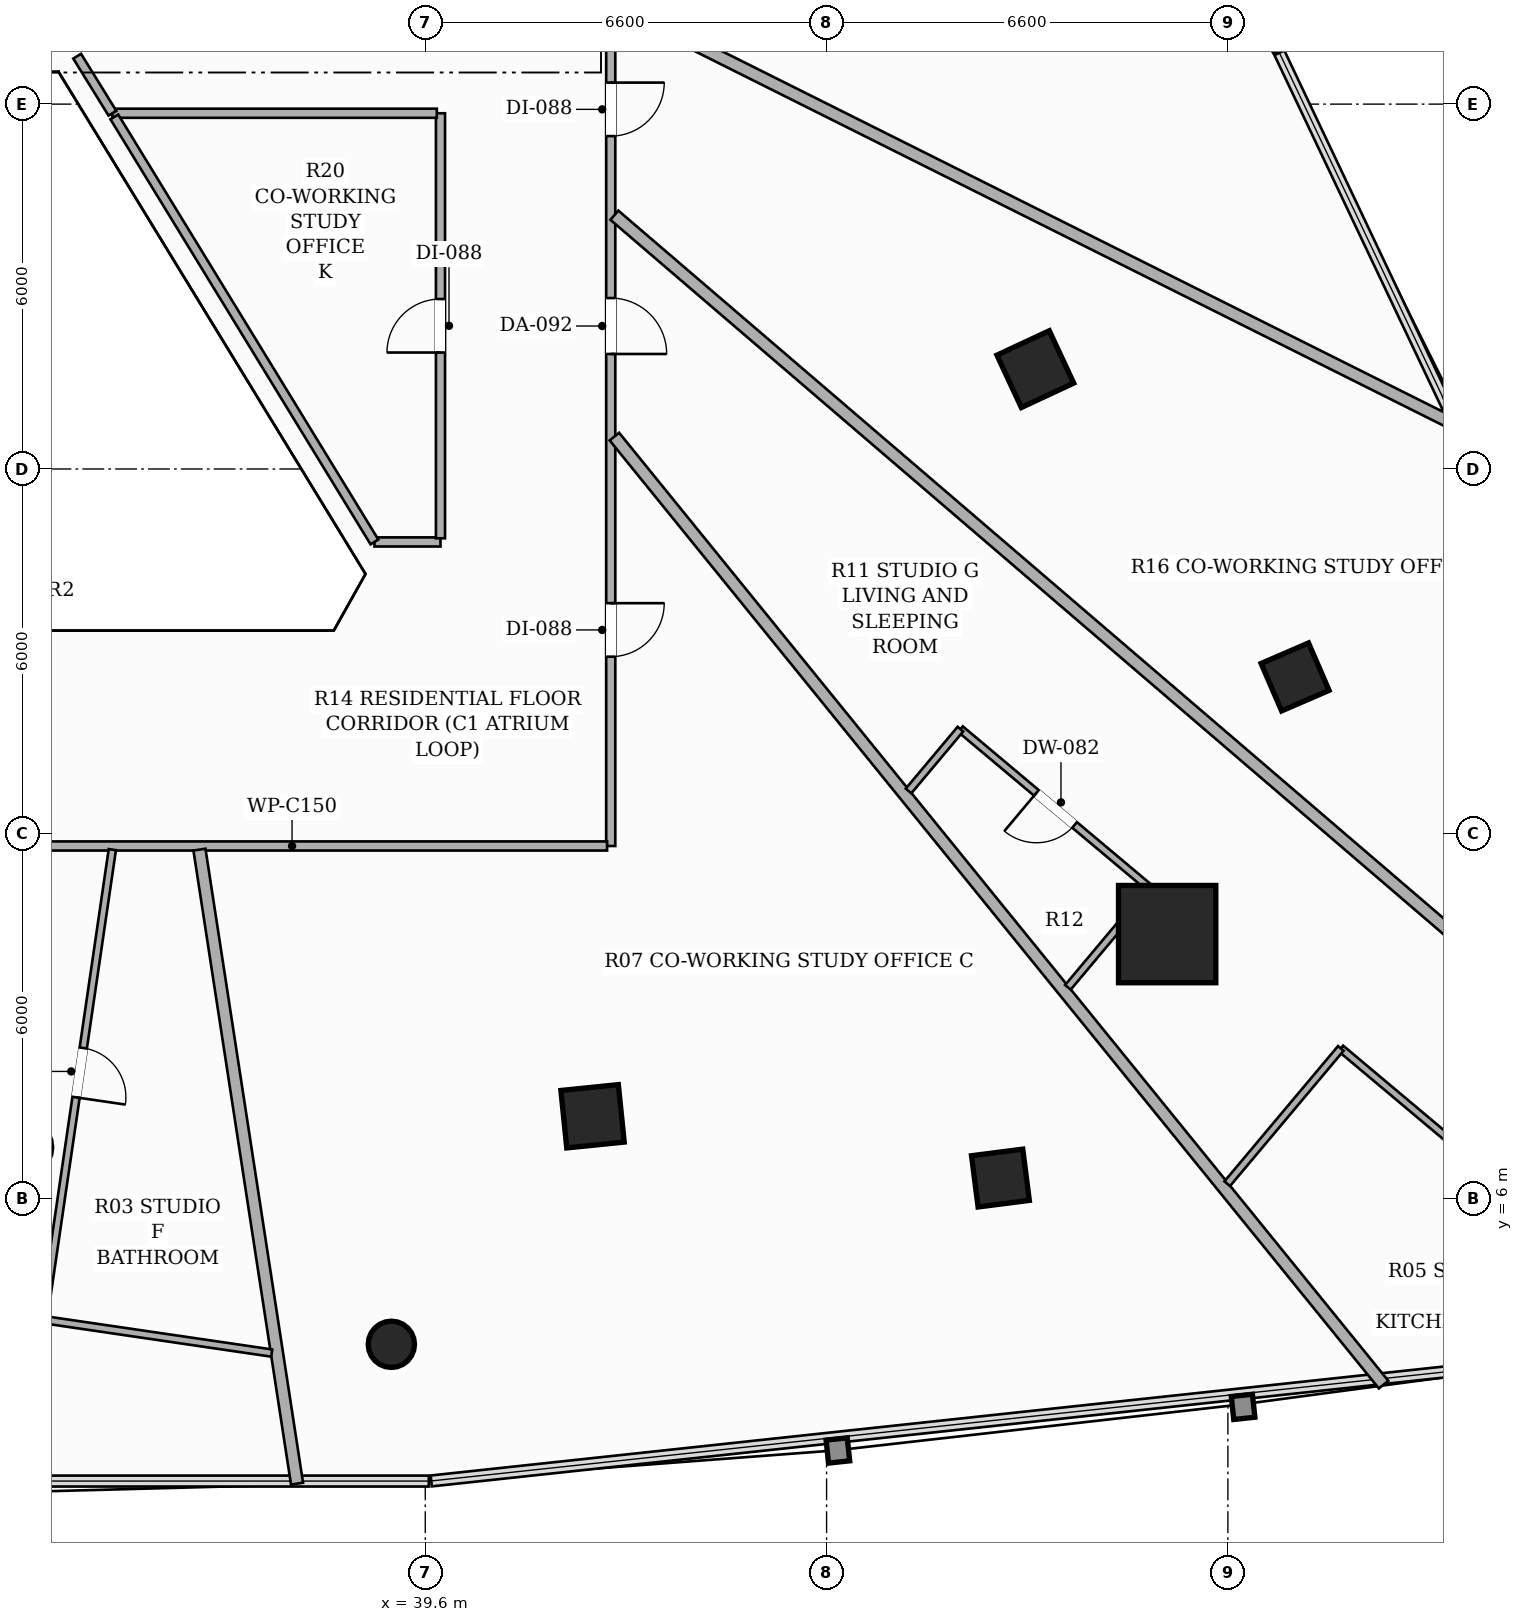
"""IFC4 building model, lengths in metres.
Left out: names, types, materials, properties, quantities, classifications, styles, units other than length and angle.
Written with IfcOpenShell. Run it as: python <this file> out.ifc"""

import sys

from ifc_helpers import new_model, si_unit, direction, frame, frame_2d, origin, origin_2d, place, context, subcontext, project, spatial, rectangle, hollow_rectangle, hollow_circle, extrude, element, fill, save


model = new_model("IFC4")
c1 = context("Model", 3, precision=1e-05, world=origin(), true_north=direction((0.0, 1.0)))
c2 = subcontext(c1, "Body", "Model", "MODEL_VIEW")
j1 = project(units=[si_unit("LENGTHUNIT", "METRE"), si_unit("PLANEANGLEUNIT", "RADIAN")], contexts=[c1])
p1 = place(None, origin())
s1 = spatial("IfcSite", under=j1, at=p1, CompositionType="ELEMENT")
p2 = place(p1, origin())
s2 = spatial("IfcBuilding", under=s1, at=p2, CompositionType="ELEMENT")
p3 = place(p2, frame((0.0, 0.0, 33.5)))
s3 = spatial("IfcBuildingStorey", under=s2, at=p3, CompositionType="ELEMENT", Elevation=33.5)
p4 = place(p3, frame((51.801, 10.351, 0.0), z_axis=(0.0, 0.0, 1.0), x_axis=(1.0, 0.0, 0.0)))
e1 = element("IfcColumn", 1, at=p4, inside=s3, PredefinedType="COLUMN", context=c2, shape_type="SweptSolid", body=[
    extrude(hollow_rectangle(XDim=1.6, YDim=1.6, WallThickness=0.05, at=origin_2d()), origin(), (0.0, 0.0, 1.0), 3.3),
])
p5 = place(p3, frame((33.0, 6.844, 0.0), z_axis=(0.0, 0.0, 1.0), x_axis=(1.0, 0.0, 0.0)))
e2 = element("IfcColumn", 2, at=p5, inside=s3, PredefinedType="COLUMN", context=c2, shape_type="SweptSolid", body=[
    extrude(hollow_circle(Radius=0.457, WallThickness=0.025, at=origin_2d()), origin(), (0.0, 0.0, 1.0), 3.3),
])
for number, where, z_axis, x_axis in (
    (3, (42.351, 7.355, 0.0), (0.0, 0.0, 1.0), (0.995, 0.101, 0.0)),
    (4, (49.633, 19.642, 0.0), (0.0, 0.0, 1.0), (-0.423, 0.906, 0.0)),
):
    element("IfcColumn", number, at=place(p3, frame(where, z_axis=z_axis, x_axis=x_axis)), inside=s3, PredefinedType="COLUMN", context=c2, shape_type="SweptSolid", body=[
        extrude(hollow_rectangle(XDim=0.95, YDim=0.95, WallThickness=0.032, at=origin_2d()), origin(), (0.0, 0.0, 1.0), 3.3),
    ])
for number, where, z_axis, x_axis in (
    (5, (49.059, 6.339, 0.0), (0.0, 0.0, 1.0), (0.992, 0.127, 0.0)),
    (6, (53.905, 14.58, 0.0), (0.0, 0.0, 1.0), (-0.397, 0.918, 0.0)),
):
    element("IfcColumn", number, at=place(p3, frame(where, z_axis=z_axis, x_axis=x_axis)), inside=s3, PredefinedType="COLUMN", context=c2, shape_type="SweptSolid", body=[
        extrude(hollow_rectangle(XDim=0.85, YDim=0.85, WallThickness=0.028, at=origin_2d()), origin(), (0.0, 0.0, 1.0), 3.3),
    ])
p6 = place(p3, frame((39.042, 3.605, 0.0), z_axis=(0.0, 0.0, 1.0), x_axis=(1.0, 0.0, 0.0)))
e7 = element("IfcColumn", 7, at=p6, inside=s3, PredefinedType="COLUMN", context=c2, shape_type="SweptSolid", body=[
    extrude(hollow_circle(Radius=0.381, WallThickness=0.022, at=origin_2d()), origin(), (0.0, 0.0, 1.0), 3.3),
])
p7 = place(p3, frame((42.65, 36.84, 0.0), z_axis=(0.0, 0.0, 1.0), x_axis=(0.0, -1.0, 0.0)))
e8 = element("IfcWall", 8, at=p7, inside=s3, PredefinedType="PARTITIONING", context=c2, shape_type="SweptSolid", body=[
    extrude(rectangle(XDim=25.04, YDim=0.15, at=frame_2d((12.52, 0.0))), origin(), (0.0, 0.0, 1.0), 2.413),
])
p8 = place(p7, frame((1.219, 0.0, 0.0)))
e9 = element("IfcOpeningElement", 9, at=p8, cuts=e8, PredefinedType="OPENING", context=c2, shape_type="SweptSolid", body=[
    extrude(rectangle(XDim=0.88, YDim=2.1, at=frame_2d((0.44, 1.05))), frame((0.0, 0.085, 0.0), z_axis=(0.0, -1.0, 0.0), x_axis=(1.0, 0.0, 0.0)), (0.0, 0.0, 1.0), 0.17),
])
p9 = place(p7, frame((21.047, 0.0, 0.0)))
e10 = element("IfcOpeningElement", 10, at=p9, cuts=e8, PredefinedType="OPENING", context=c2, shape_type="SweptSolid", body=[
    extrude(rectangle(XDim=0.88, YDim=2.1, at=frame_2d((0.44, 1.05))), frame((0.0, 0.085, 0.0), z_axis=(0.0, -1.0, 0.0), x_axis=(1.0, 0.0, 0.0)), (0.0, 0.0, 1.0), 0.17),
])
p10 = place(p7, frame((16.029, 0.0, 0.0)))
e11 = element("IfcOpeningElement", 11, at=p10, cuts=e8, PredefinedType="OPENING", context=c2, shape_type="SweptSolid", body=[
    extrude(rectangle(XDim=0.92, YDim=2.15, at=frame_2d((0.46, 1.075))), frame((0.0, 0.085, 0.0), z_axis=(0.0, -1.0, 0.0), x_axis=(1.0, 0.0, 0.0)), (0.0, 0.0, 1.0), 0.17),
])
p11 = place(p7, frame((12.486, 0.0, 0.0)))
e12 = element("IfcOpeningElement", 12, at=p11, cuts=e8, PredefinedType="OPENING", context=c2, shape_type="SweptSolid", body=[
    extrude(rectangle(XDim=0.88, YDim=2.1, at=frame_2d((0.44, 1.05))), frame((0.0, 0.085, 0.0), z_axis=(0.0, -1.0, 0.0), x_axis=(1.0, 0.0, 0.0)), (0.0, 0.0, 1.0), 0.17),
])
p12 = place(p7, frame((6.638, 0.0, 0.0)))
e13 = element("IfcOpeningElement", 13, at=p12, cuts=e8, PredefinedType="OPENING", context=c2, shape_type="SweptSolid", body=[
    extrude(rectangle(XDim=0.92, YDim=2.15, at=frame_2d((0.46, 1.075))), frame((0.0, 0.085, 0.0), z_axis=(0.0, -1.0, 0.0), x_axis=(1.0, 0.0, 0.0)), (0.0, 0.0, 1.0), 0.17),
])
p13 = place(p3, frame((42.59, 11.8, 0.0), z_axis=(0.0, 0.0, 1.0), x_axis=(-1.0, 0.0, 0.0)))
e14 = element("IfcWall", 14, at=p13, inside=s3, PredefinedType="PARTITIONING", context=c2, shape_type="SweptSolid", body=[
    extrude(rectangle(XDim=19.24, YDim=0.15, at=frame_2d((9.62, 0.0))), origin(), (0.0, 0.0, 1.0), 2.669),
])
p14 = place(p13, frame((10.462, 0.0, 0.0)))
e15 = element("IfcOpeningElement", 15, at=p14, cuts=e14, PredefinedType="OPENING", context=c2, shape_type="SweptSolid", body=[
    extrude(rectangle(XDim=0.92, YDim=2.15, at=frame_2d((0.46, 1.075))), frame((0.0, 0.085, 0.0), z_axis=(0.0, -1.0, 0.0), x_axis=(1.0, 0.0, 0.0)), (0.0, 0.0, 1.0), 0.17),
])
p15 = place(p3, frame((38.764, 16.8, 0.0), z_axis=(0.0, 0.0, 1.0), x_axis=(1.0, 0.0, 0.0)))
e16 = element("IfcWall", 16, at=p15, inside=s3, PredefinedType="PARTITIONING", context=c2, shape_type="SweptSolid", body=[
    extrude(rectangle(XDim=1.086, YDim=0.15, at=frame_2d((0.543, 0.0))), origin(), (0.0, 0.0, 1.0), 3.06),
])
p16 = place(p3, frame((39.85, 16.86, 0.0), z_axis=(0.0, 0.0, 1.0), x_axis=(0.0, 1.0, 0.0)))
e17 = element("IfcWall", 17, at=p16, inside=s3, PredefinedType="PARTITIONING", context=c2, shape_type="SweptSolid", body=[
    extrude(rectangle(XDim=6.99, YDim=0.15, at=frame_2d((3.495, 0.0))), origin(), (0.0, 0.0, 1.0), 2.669),
])
p17 = place(p16, frame((3.055, 0.0, 0.0)))
e18 = element("IfcOpeningElement", 18, at=p17, cuts=e17, PredefinedType="OPENING", context=c2, shape_type="SweptSolid", body=[
    extrude(rectangle(XDim=0.88, YDim=2.1, at=frame_2d((0.44, 1.05))), frame((0.0, 0.085, 0.0), z_axis=(0.0, -1.0, 0.0), x_axis=(1.0, 0.0, 0.0)), (0.0, 0.0, 1.0), 0.17),
])
p18 = place(p3, frame((39.79, 23.85, 0.0), z_axis=(0.0, 0.0, 1.0), x_axis=(-1.0, 0.0, 0.0)))
e19 = element("IfcWall", 19, at=p18, inside=s3, PredefinedType="PARTITIONING", context=c2, shape_type="SweptSolid", body=[
    extrude(rectangle(XDim=5.335, YDim=0.15, at=frame_2d((2.667, 0.0))), origin(), (0.0, 0.0, 1.0), 2.669),
])
p19 = place(p3, frame((34.455, 23.85, 0.0), z_axis=(0.0, 0.0, 1.0), x_axis=(-0.525973516201, 0.850500946652, 0.0)))
e20 = element("IfcWall", 20, at=p19, inside=s3, PredefinedType="PARTITIONING", context=c2, shape_type="SweptSolid", body=[
    extrude(rectangle(XDim=1.103, YDim=0.15, at=frame_2d((0.551, 0.0))), origin(), (0.0, 0.0, 1.0), 3.06),
])
p20 = place(p3, frame((34.486, 23.79, 0.0), z_axis=(0.0, 0.0, 1.0), x_axis=(0.521998190399, -0.852946592244, 0.0)))
e21 = element("IfcWall", 21, at=p20, inside=s3, PredefinedType="PARTITIONING", context=c2, shape_type="SweptSolid", body=[
    extrude(rectangle(XDim=8.195, YDim=0.15, at=frame_2d((4.098, 0.0))), origin(), (0.0, 0.0, 1.0), 2.669),
])
p21 = place(p3, frame((37.491, 1.313, 0.0), z_axis=(0.0, 0.0, 1.0), x_axis=(-0.152133698634, 0.988359923176, 0.0)))
e22 = element("IfcWall", 22, at=p21, inside=s3, PredefinedType="PARTITIONING", context=c2, shape_type="SweptSolid", body=[
    extrude(rectangle(XDim=10.55, YDim=0.2, at=frame_2d((5.275, 0.0))), origin(), (0.0, 0.0, 1.0), 2.413),
])
p22 = place(p3, frame((42.71, 18.533, 0.0), z_axis=(0.0, 0.0, 1.0), x_axis=(0.630093983448, -0.776518880661, 0.0)))
e23 = element("IfcWall", 23, at=p22, inside=s3, PredefinedType="PARTITIONING", context=c2, shape_type="SweptSolid", body=[
    extrude(rectangle(XDim=20.078, YDim=0.2, at=frame_2d((10.039, 0.0))), origin(), (0.0, 0.0, 1.0), 2.413),
])
p23 = place(p3, frame((42.71, 22.173, 0.0), z_axis=(0.0, 0.0, 1.0), x_axis=(0.759115981911, -0.650955394791, 0.0)))
e24 = element("IfcWall", 24, at=p23, inside=s3, PredefinedType="PARTITIONING", context=c2, shape_type="SweptSolid", body=[
    extrude(rectangle(XDim=25.249, YDim=0.2, at=frame_2d((12.625, 0.0))), origin(), (0.0, 0.0, 1.0), 2.413),
])
p24 = place(p3, frame((42.71, 25.644, 0.0), z_axis=(0.0, 0.0, 1.0), x_axis=(0.894389742198, -0.447288485265, 0.0)))
e25 = element("IfcWall", 25, at=p24, inside=s3, PredefinedType="PARTITIONING", context=c2, shape_type="SweptSolid", body=[
    extrude(rectangle(XDim=15.648, YDim=0.2, at=frame_2d((7.824, 0.0))), origin(), (0.0, 0.0, 1.0), 2.413),
])
p25 = place(p3, frame((34.453, 11.74, 0.0), z_axis=(0.0, 0.0, 1.0), x_axis=(-0.14489470787, -0.989447079753, 0.0)))
e26 = element("IfcWall", 26, at=p25, inside=s3, PredefinedType="PARTITIONING", context=c2, shape_type="SweptSolid", body=[
    extrude(rectangle(XDim=7.812, YDim=0.12, at=frame_2d((3.906, 0.0))), origin(), (0.0, 0.0, 1.0), 2.413),
])
p26 = place(p25, frame((3.297, 0.0, 0.0)))
e27 = element("IfcOpeningElement", 27, at=p26, cuts=e26, PredefinedType="OPENING", context=c2, shape_type="SweptSolid", body=[
    extrude(rectangle(XDim=0.82, YDim=2.1, at=frame_2d((0.41, 1.05))), frame((0.0, 0.07, 0.0), z_axis=(0.0, -1.0, 0.0), x_axis=(1.0, 0.0, 0.0)), (0.0, 0.0, 1.0), 0.14),
])
p27 = place(p3, frame((33.321, 4.011, 0.0), z_axis=(0.0, 0.0, 1.0), x_axis=(0.98942932615, -0.145015890698, 0.0)))
e28 = element("IfcWall", 28, at=p27, inside=s3, PredefinedType="PARTITIONING", context=c2, shape_type="SweptSolid", body=[
    extrude(rectangle(XDim=3.793, YDim=0.12, at=frame_2d((1.896, 0.0))), origin(), (0.0, 0.0, 1.0), 3.06),
])
p28 = place(p3, frame((50.169, 9.476, 0.0), z_axis=(0.0, 0.0, 1.0), x_axis=(0.642802339764, 0.766032082875, 0.0)))
e29 = element("IfcWall", 29, at=p28, inside=s3, PredefinedType="PARTITIONING", context=c2, shape_type="SweptSolid", body=[
    extrude(rectangle(XDim=2.116, YDim=0.12, at=frame_2d((1.058, 0.0))), origin(), (0.0, 0.0, 1.0), 2.413),
])
p29 = place(p3, frame((51.529, 11.097, 0.0), z_axis=(0.0, 0.0, 1.0), x_axis=(-0.766026296222, 0.642809235696, 0.0)))
e30 = element("IfcWall", 30, at=p29, inside=s3, PredefinedType="PARTITIONING", context=c2, shape_type="SweptSolid", body=[
    extrude(rectangle(XDim=4.084, YDim=0.12, at=frame_2d((2.042, 0.0))), origin(), (0.0, 0.0, 1.0), 2.413),
])
p30 = place(p29, frame((1.632, 0.0, 0.0)))
e31 = element("IfcOpeningElement", 31, at=p30, cuts=e30, PredefinedType="OPENING", context=c2, shape_type="SweptSolid", body=[
    extrude(rectangle(XDim=0.82, YDim=2.1, at=frame_2d((0.41, 1.05))), frame((0.0, 0.07, 0.0), z_axis=(0.0, -1.0, 0.0), x_axis=(1.0, 0.0, 0.0)), (0.0, 0.0, 1.0), 0.14),
])
p31 = place(p3, frame((48.401, 13.722, 0.0), z_axis=(0.0, 0.0, 1.0), x_axis=(-0.642587875402, -0.76621199572, 0.0)))
e32 = element("IfcWall", 32, at=p31, inside=s3, PredefinedType="PARTITIONING", context=c2, shape_type="SweptSolid", body=[
    extrude(rectangle(XDim=1.327, YDim=0.12, at=frame_2d((0.664, 0.0))), origin(), (0.0, 0.0, 1.0), 3.06),
])
p32 = place(p3, frame((60.287, 3.745, 0.0), z_axis=(0.0, 0.0, 1.0), x_axis=(-0.765937745649, 0.642914745351, 0.0)))
e33 = element("IfcWall", 33, at=p32, inside=s3, PredefinedType="PARTITIONING", context=c2, shape_type="SweptSolid", body=[
    extrude(rectangle(XDim=7.351, YDim=0.12, at=frame_2d((3.675, 0.0))), origin(), (0.0, 0.0, 1.0), 2.619),
])
p33 = place(p32, frame((3.235, 0.0, 0.0)))
e34 = element("IfcOpeningElement", 34, at=p33, cuts=e33, PredefinedType="OPENING", context=c2, shape_type="SweptSolid", body=[
    extrude(rectangle(XDim=0.88, YDim=2.1, at=frame_2d((0.44, 1.05))), frame((0.0, 0.07, 0.0), z_axis=(0.0, -1.0, 0.0), x_axis=(1.0, 0.0, 0.0)), (0.0, 0.0, 1.0), 0.14),
])
p34 = place(p3, frame((54.657, 8.471, 0.0), z_axis=(0.0, 0.0, 1.0), x_axis=(-0.6429989132, -0.765867088746, 0.0)))
e35 = element("IfcWall", 35, at=p34, inside=s3, PredefinedType="PARTITIONING", context=c2, shape_type="SweptSolid", body=[
    extrude(rectangle(XDim=2.905, YDim=0.12, at=frame_2d((1.453, 0.0))), origin(), (0.0, 0.0, 1.0), 3.06),
])
p35 = place(p9, origin())
e36 = element("IfcDoor", 36, at=p35, inside=s3, OperationType="SINGLE_SWING_LEFT", PredefinedType="DOOR", context=c2, shape_type="SweptSolid", body=[
    extrude(rectangle(XDim=0.88, YDim=2.1, at=frame_2d((0.44, 1.05))), frame((0.0, 0.025, 0.0), z_axis=(0.0, -1.0, 0.0), x_axis=(1.0, 0.0, 0.0)), (0.0, 0.0, 1.0), 0.05),
])
fill(e10, e36)
p36 = place(p26, origin())
e37 = element("IfcDoor", 37, at=p36, inside=s3, OperationType="SINGLE_SWING_RIGHT", PredefinedType="DOOR", context=c2, shape_type="SweptSolid", body=[
    extrude(rectangle(XDim=0.82, YDim=2.1, at=frame_2d((0.41, 1.05))), frame((0.0, 0.025, 0.0), z_axis=(0.0, -1.0, 0.0), x_axis=(1.0, 0.0, 0.0)), (0.0, 0.0, 1.0), 0.05),
])
fill(e27, e37)
p37 = place(p10, origin())
e38 = element("IfcDoor", 38, at=p37, inside=s3, OperationType="SINGLE_SWING_RIGHT", PredefinedType="DOOR", context=c2, shape_type="SweptSolid", body=[
    extrude(rectangle(XDim=0.92, YDim=2.15, at=frame_2d((0.46, 1.075))), frame((0.0, 0.025, 0.0), z_axis=(0.0, -1.0, 0.0), x_axis=(1.0, 0.0, 0.0)), (0.0, 0.0, 1.0), 0.05),
])
fill(e11, e38)
p38 = place(p30, origin())
e39 = element("IfcDoor", 39, at=p38, inside=s3, OperationType="SINGLE_SWING_RIGHT", PredefinedType="DOOR", context=c2, shape_type="SweptSolid", body=[
    extrude(rectangle(XDim=0.82, YDim=2.1, at=frame_2d((0.41, 1.05))), frame((0.0, 0.025, 0.0), z_axis=(0.0, -1.0, 0.0), x_axis=(1.0, 0.0, 0.0)), (0.0, 0.0, 1.0), 0.05),
])
fill(e31, e39)
p39 = place(p11, origin())
e40 = element("IfcDoor", 40, at=p39, inside=s3, OperationType="SINGLE_SWING_LEFT", PredefinedType="DOOR", context=c2, shape_type="SweptSolid", body=[
    extrude(rectangle(XDim=0.88, YDim=2.1, at=frame_2d((0.44, 1.05))), frame((0.0, 0.025, 0.0), z_axis=(0.0, -1.0, 0.0), x_axis=(1.0, 0.0, 0.0)), (0.0, 0.0, 1.0), 0.05),
])
fill(e12, e40)
p40 = place(p17, origin())
e41 = element("IfcDoor", 41, at=p40, inside=s3, OperationType="SINGLE_SWING_LEFT", PredefinedType="DOOR", context=c2, shape_type="SweptSolid", body=[
    extrude(rectangle(XDim=0.88, YDim=2.1, at=frame_2d((0.44, 1.05))), frame((0.0, 0.025, 0.0), z_axis=(0.0, -1.0, 0.0), x_axis=(1.0, 0.0, 0.0)), (0.0, 0.0, 1.0), 0.05),
])
fill(e18, e41)
save(model, sys.argv[1])
